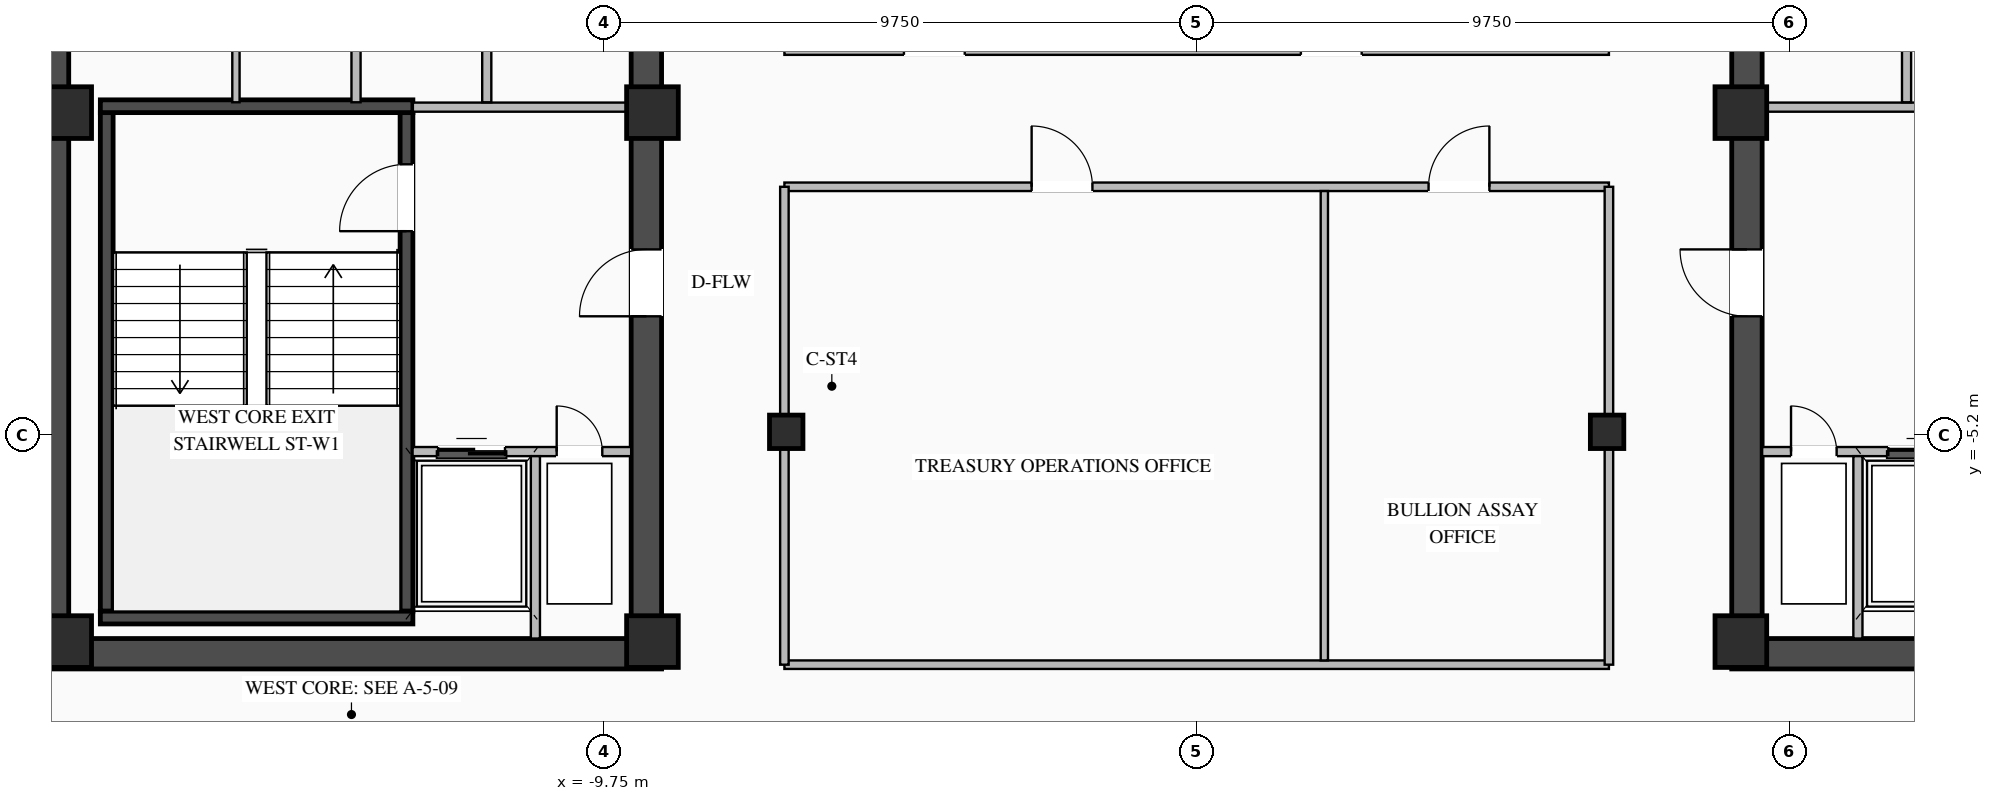
"""IFC4 building model, lengths in metres.
Left out: names, types, materials, properties, quantities, classifications, styles, units other than length and angle.
Written with IfcOpenShell. Run it as: python <this file> out.ifc"""

import sys

from ifc_helpers import new_model, si_unit, direction, frame, frame_2d, origin, origin_2d, place, context, subcontext, project, spatial, rectangle, i_section, extrude, element, fill, save


model = new_model("IFC4")
c1 = context("Model", 3, precision=1e-05, world=origin(), true_north=direction((0.0, 1.0)))
c2 = subcontext(c1, "Body", "Model", "MODEL_VIEW")
j1 = project(units=[si_unit("LENGTHUNIT", "METRE"), si_unit("PLANEANGLEUNIT", "RADIAN")], contexts=[c1])
p1 = place(None, origin())
s1 = spatial("IfcSite", under=j1, at=p1, CompositionType="ELEMENT")
p2 = place(p1, origin())
s2 = spatial("IfcBuilding", under=s1, at=p2, CompositionType="ELEMENT")
p3 = place(p2, frame((0.0, 0.0, 208.5)))
s3 = spatial("IfcBuildingStorey", under=s2, at=p3, CompositionType="ELEMENT", Elevation=208.5)
p4 = place(p3, frame((-19.05, -8.8, 0.0), z_axis=(0.0, 0.0, 1.0), x_axis=(1.0, 0.0, 0.0)))
e1 = element("IfcWall", 1, at=p4, inside=s3, PredefinedType="SHEAR", context=c2, shape_type="SweptSolid", body=[
    extrude(rectangle(XDim=10.25, YDim=0.5, at=frame_2d((5.125, 0.0))), origin(), (0.0, 0.0, 1.0), 3.27),
])
p5 = place(p3, frame((-18.8, -8.55, 0.0), z_axis=(0.0, 0.0, 1.0), x_axis=(0.0, 1.0, 0.0)))
e2 = element("IfcWall", 2, at=p5, inside=s3, PredefinedType="SHEAR", context=c2, shape_type="SweptSolid", body=[
    extrude(rectangle(XDim=17.1, YDim=0.5, at=frame_2d((8.55, 0.0))), origin(), (0.0, 0.0, 1.0), 3.27),
])
p6 = place(p3, frame((-9.05, -8.55, 0.0), z_axis=(0.0, 0.0, 1.0), x_axis=(0.0, 1.0, 0.0)))
e3 = element("IfcWall", 3, at=p6, inside=s3, PredefinedType="SHEAR", context=c2, shape_type="SweptSolid", body=[
    extrude(rectangle(XDim=17.1, YDim=0.5, at=frame_2d((8.55, 0.0))), origin(), (0.0, 0.0, 1.0), 3.27),
])
p7 = place(p6, frame((5.3, 0.0, 0.0)))
e4 = element("IfcOpeningElement", 4, at=p7, cuts=e3, PredefinedType="OPENING", context=c2, shape_type="SweptSolid", body=[
    extrude(rectangle(XDim=1.1, YDim=2.08, at=frame_2d((0.55, 1.04))), frame((0.0, 0.26, 0.0), z_axis=(0.0, -1.0, 0.0), x_axis=(1.0, 0.0, 0.0)), (0.0, 0.0, 1.0), 0.52),
])
p8 = place(p3, frame((-12.995, -8.1, 0.0), z_axis=(0.0, 0.0, 1.0), x_axis=(0.0, 1.0, 0.0)))
e5 = element("IfcWall", 5, at=p8, inside=s3, PredefinedType="SHEAR", context=c2, shape_type="SweptSolid", body=[
    extrude(rectangle(XDim=8.2, YDim=0.21, at=frame_2d((4.1, 0.0))), origin(), (0.0, 0.0, 1.0), 3.27),
])
p9 = place(p8, frame((6.25, 0.0, 0.0)))
e6 = element("IfcOpeningElement", 6, at=p9, cuts=e5, PredefinedType="OPENING", context=c2, shape_type="SweptSolid", body=[
    extrude(rectangle(XDim=1.1, YDim=2.15, at=frame_2d((0.55, 1.075))), frame((0.0, 0.115, 0.0), z_axis=(0.0, -1.0, 0.0), x_axis=(1.0, 0.0, 0.0)), (0.0, 0.0, 1.0), 0.23),
])
p10 = place(p3, frame((-17.925, -8.1, 0.0), z_axis=(0.0, 0.0, 1.0), x_axis=(0.0, 1.0, 0.0)))
e7 = element("IfcWall", 7, at=p10, inside=s3, PredefinedType="SHEAR", context=c2, shape_type="SweptSolid", body=[
    extrude(rectangle(XDim=8.2, YDim=0.21, at=frame_2d((4.1, 0.0))), origin(), (0.0, 0.0, 1.0), 3.27),
])
for number, where, z_axis, x_axis in (
    (8, (-18.03, -8.205, 0.0), (0.0, 0.0, 1.0), (1.0, 0.0, 0.0)),
    (9, (-12.89, 0.205, 0.0), (0.0, 0.0, 1.0), (-1.0, 0.0, 0.0)),
):
    element("IfcWall", number, at=place(p3, frame(where, z_axis=z_axis, x_axis=x_axis)), inside=s3, PredefinedType="SHEAR", context=c2, shape_type="SweptSolid", body=[
        extrude(rectangle(XDim=5.14, YDim=0.21, at=frame_2d((2.57, 0.0))), origin(), (0.0, 0.0, 1.0), 3.27),
    ])
p11 = place(p3, frame((8.8, -8.8, 0.0), z_axis=(0.0, 0.0, 1.0), x_axis=(1.0, 0.0, 0.0)))
e10 = element("IfcWall", 10, at=p11, inside=s3, PredefinedType="SHEAR", context=c2, shape_type="SweptSolid", body=[
    extrude(rectangle(XDim=10.25, YDim=0.5, at=frame_2d((5.125, 0.0))), origin(), (0.0, 0.0, 1.0), 3.27),
])
p12 = place(p3, frame((9.05, -8.55, 0.0), z_axis=(0.0, 0.0, 1.0), x_axis=(0.0, 1.0, 0.0)))
e11 = element("IfcWall", 11, at=p12, inside=s3, PredefinedType="SHEAR", context=c2, shape_type="SweptSolid", body=[
    extrude(rectangle(XDim=17.1, YDim=0.5, at=frame_2d((8.55, 0.0))), origin(), (0.0, 0.0, 1.0), 3.27),
])
p13 = place(p12, frame((5.3, 0.0, 0.0)))
e12 = element("IfcOpeningElement", 12, at=p13, cuts=e11, PredefinedType="OPENING", context=c2, shape_type="SweptSolid", body=[
    extrude(rectangle(XDim=1.1, YDim=2.08, at=frame_2d((0.55, 1.04))), frame((0.0, 0.26, 0.0), z_axis=(0.0, -1.0, 0.0), x_axis=(1.0, 0.0, 0.0)), (0.0, 0.0, 1.0), 0.52),
])
for number, where, z_axis, x_axis in (
    (13, (-8.95, -8.6, 0.0), (0.0, 0.0, 1.0), (1.0, 0.0, 0.0)),
    (14, (-8.95, 0.1, 0.0), (0.0, 0.0, 1.0), (1.0, 0.0, 0.0)),
    (15, (-18.6, -8.6, 0.0), (0.0, 0.0, 1.0), (1.0, 0.0, 0.0)),
    (16, (-18.6, 0.1, 0.0), (0.0, 0.0, 1.0), (1.0, 0.0, 0.0)),
    (17, (8.95, -8.6, 0.0), (0.0, 0.0, 1.0), (1.0, 0.0, 0.0)),
    (18, (8.95, 0.1, 0.0), (0.0, 0.0, 1.0), (1.0, 0.0, 0.0)),
):
    element("IfcColumn", number, at=place(p3, frame(where, z_axis=z_axis, x_axis=x_axis)), inside=s3, PredefinedType="COLUMN", context=c2, shape_type="SweptSolid", body=[
        extrude(rectangle(XDim=0.85, YDim=0.85, at=origin_2d()), origin(), (0.0, 0.0, 1.0), 3.45),
    ])
for number, where, z_axis, x_axis in (
    (19, (-6.75, -5.15, 0.0), (0.0, 0.0, 1.0), (1.0, 0.0, 0.0)),
    (20, (6.75, -5.15, 0.0), (0.0, 0.0, 1.0), (1.0, 0.0, 0.0)),
):
    element("IfcColumn", number, at=place(p3, frame(where, z_axis=z_axis, x_axis=x_axis)), inside=s3, PredefinedType="COLUMN", context=c2, shape_type="SweptSolid", body=[
        extrude(i_section(OverallWidth=0.55, OverallDepth=0.55, WebThickness=0.024, FlangeThickness=0.036, at=origin_2d()), origin(), (0.0, 0.0, 1.0), 3.45),
    ])
p14 = place(p3, frame((-12.895, -5.475, 0.0), z_axis=(0.0, 0.0, 1.0), x_axis=(1.0, 0.0, 0.0)))
e21 = element("IfcWall", 21, at=p14, inside=s3, PredefinedType="STANDARD", context=c2, shape_type="SweptSolid", body=[
    extrude(rectangle(XDim=3.595, YDim=0.15, at=frame_2d((1.797, 0.0))), origin(), (0.0, 0.0, 1.0), 3.25),
])
p15 = place(p14, frame((0.42, 0.0, 0.0)))
e22 = element("IfcOpeningElement", 22, at=p15, cuts=e21, PredefinedType="OPENING", context=c2, shape_type="SweptSolid", body=[
    extrude(rectangle(XDim=1.1, YDim=2.15, at=frame_2d((0.55, 1.075))), frame((0.0, 0.085, 0.0), z_axis=(0.0, -1.0, 0.0), x_axis=(1.0, 0.0, 0.0)), (0.0, 0.0, 1.0), 0.17),
])
p16 = place(p14, frame((2.37, 0.0, 0.0)))
e23 = element("IfcOpeningElement", 23, at=p16, cuts=e21, PredefinedType="OPENING", context=c2, shape_type="SweptSolid", body=[
    extrude(rectangle(XDim=0.75, YDim=2.05, at=frame_2d((0.375, 1.025))), frame((0.0, 0.085, 0.0), z_axis=(0.0, -1.0, 0.0), x_axis=(1.0, 0.0, 0.0)), (0.0, 0.0, 1.0), 0.17),
])
p17 = place(p3, frame((-10.875, -8.55, 0.0), z_axis=(0.0, 0.0, 1.0), x_axis=(0.0, 1.0, 0.0)))
e24 = element("IfcWall", 24, at=p17, inside=s3, PredefinedType="STANDARD", context=c2, shape_type="SweptSolid", body=[
    extrude(rectangle(XDim=3.0, YDim=0.15, at=frame_2d((1.5, 0.0))), origin(), (0.0, 0.0, 1.0), 3.25),
])
p18 = place(p3, frame((-12.89, 0.19, 0.0), z_axis=(0.0, 0.0, 1.0), x_axis=(1.0, 0.0, 0.0)))
e25 = element("IfcWall", 25, at=p18, inside=s3, PredefinedType="STANDARD", context=c2, shape_type="SweptSolid", body=[
    extrude(rectangle(XDim=3.59, YDim=0.15, at=frame_2d((1.795, 0.0))), origin(), (0.0, 0.0, 1.0), 2.645),
])
p19 = place(p3, frame((-11.675, 0.27, 0.0), z_axis=(0.0, 0.0, 1.0), x_axis=(0.0, 1.0, 0.0)))
e26 = element("IfcWall", 26, at=p19, inside=s3, PredefinedType="STANDARD", context=c2, shape_type="SweptSolid", body=[
    extrude(rectangle(XDim=8.28, YDim=0.15, at=frame_2d((4.14, 0.0))), origin(), (0.0, 0.0, 1.0), 3.25),
])
p20 = place(p19, frame((2.65, 0.0, 0.0)))
e27 = element("IfcOpeningElement", 27, at=p20, cuts=e26, PredefinedType="OPENING", context=c2, shape_type="SweptSolid", body=[
    extrude(rectangle(XDim=0.9, YDim=2.05, at=frame_2d((0.45, 1.025))), frame((0.0, 0.085, 0.0), z_axis=(0.0, -1.0, 0.0), x_axis=(1.0, 0.0, 0.0)), (0.0, 0.0, 1.0), 0.17),
])
p21 = place(p19, frame((6.45, 0.0, 0.0)))
e28 = element("IfcOpeningElement", 28, at=p21, cuts=e26, PredefinedType="OPENING", context=c2, shape_type="SweptSolid", body=[
    extrude(rectangle(XDim=0.9, YDim=2.05, at=frame_2d((0.45, 1.025))), frame((0.0, 0.085, 0.0), z_axis=(0.0, -1.0, 0.0), x_axis=(1.0, 0.0, 0.0)), (0.0, 0.0, 1.0), 0.17),
])
p22 = place(p3, frame((-13.825, 0.27, 0.0), z_axis=(0.0, 0.0, 1.0), x_axis=(0.0, 1.0, 0.0)))
e29 = element("IfcWall", 29, at=p22, inside=s3, PredefinedType="STANDARD", context=c2, shape_type="SweptSolid", body=[
    extrude(rectangle(XDim=8.28, YDim=0.15, at=frame_2d((4.14, 0.0))), origin(), (0.0, 0.0, 1.0), 3.25),
])
p23 = place(p22, frame((4.175, 0.0, 0.0)))
e30 = element("IfcOpeningElement", 30, at=p23, cuts=e29, PredefinedType="OPENING", context=c2, shape_type="SweptSolid", body=[
    extrude(rectangle(XDim=1.1, YDim=2.1, at=frame_2d((0.55, 1.05))), frame((0.0, 0.085, 0.0), z_axis=(0.0, -1.0, 0.0), x_axis=(1.0, 0.0, 0.0)), (0.0, 0.0, 1.0), 0.17),
])
p24 = place(p22, frame((6.245, 0.0, 0.0)))
e31 = element("IfcOpeningElement", 31, at=p24, cuts=e29, PredefinedType="OPENING", context=c2, shape_type="SweptSolid", body=[
    extrude(rectangle(XDim=1.1, YDim=2.1, at=frame_2d((0.55, 1.05))), frame((0.0, 0.085, 0.0), z_axis=(0.0, -1.0, 0.0), x_axis=(1.0, 0.0, 0.0)), (0.0, 0.0, 1.0), 0.17),
])
p25 = place(p22, frame((1.15, 0.0, 0.0)))
e32 = element("IfcOpeningElement", 32, at=p25, cuts=e29, PredefinedType="OPENING", context=c2, shape_type="SweptSolid", body=[
    extrude(rectangle(XDim=0.9, YDim=2.05, at=frame_2d((0.45, 1.025))), frame((0.0, 0.085, 0.0), z_axis=(0.0, -1.0, 0.0), x_axis=(1.0, 0.0, 0.0)), (0.0, 0.0, 1.0), 0.17),
])
p26 = place(p3, frame((-15.8, 0.27, 0.0), z_axis=(0.0, 0.0, 1.0), x_axis=(0.0, 1.0, 0.0)))
e33 = element("IfcWall", 33, at=p26, inside=s3, PredefinedType="STANDARD", context=c2, shape_type="SweptSolid", body=[
    extrude(rectangle(XDim=3.59, YDim=0.12, at=frame_2d((1.795, 0.0))), origin(), (0.0, 0.0, 1.0), 3.25),
])
p27 = place(p26, frame((1.25, 0.0, 0.0)))
e34 = element("IfcOpeningElement", 34, at=p27, cuts=e33, PredefinedType="OPENING", context=c2, shape_type="SweptSolid", body=[
    extrude(rectangle(XDim=0.85, YDim=2.05, at=frame_2d((0.425, 1.025))), frame((0.0, 0.07, 0.0), z_axis=(0.0, -1.0, 0.0), x_axis=(1.0, 0.0, 0.0)), (0.0, 0.0, 1.0), 0.14),
])
p28 = place(p3, frame((9.3, -5.475, 0.0), z_axis=(0.0, 0.0, 1.0), x_axis=(1.0, 0.0, 0.0)))
e35 = element("IfcWall", 35, at=p28, inside=s3, PredefinedType="STANDARD", context=c2, shape_type="SweptSolid", body=[
    extrude(rectangle(XDim=3.595, YDim=0.15, at=frame_2d((1.797, 0.0))), origin(), (0.0, 0.0, 1.0), 3.25),
])
p29 = place(p28, frame((2.075, 0.0, 0.0)))
e36 = element("IfcOpeningElement", 36, at=p29, cuts=e35, PredefinedType="OPENING", context=c2, shape_type="SweptSolid", body=[
    extrude(rectangle(XDim=1.1, YDim=2.15, at=frame_2d((0.55, 1.075))), frame((0.0, 0.085, 0.0), z_axis=(0.0, -1.0, 0.0), x_axis=(1.0, 0.0, 0.0)), (0.0, 0.0, 1.0), 0.17),
])
p30 = place(p28, frame((0.475, 0.0, 0.0)))
e37 = element("IfcOpeningElement", 37, at=p30, cuts=e35, PredefinedType="OPENING", context=c2, shape_type="SweptSolid", body=[
    extrude(rectangle(XDim=0.75, YDim=2.05, at=frame_2d((0.375, 1.025))), frame((0.0, 0.085, 0.0), z_axis=(0.0, -1.0, 0.0), x_axis=(1.0, 0.0, 0.0)), (0.0, 0.0, 1.0), 0.17),
])
p31 = place(p3, frame((10.875, -8.55, 0.0), z_axis=(0.0, 0.0, 1.0), x_axis=(0.0, 1.0, 0.0)))
e38 = element("IfcWall", 38, at=p31, inside=s3, PredefinedType="STANDARD", context=c2, shape_type="SweptSolid", body=[
    extrude(rectangle(XDim=3.0, YDim=0.15, at=frame_2d((1.5, 0.0))), origin(), (0.0, 0.0, 1.0), 3.25),
])
p32 = place(p3, frame((9.3, 0.19, 0.0), z_axis=(0.0, 0.0, 1.0), x_axis=(1.0, 0.0, 0.0)))
e39 = element("IfcWall", 39, at=p32, inside=s3, PredefinedType="STANDARD", context=c2, shape_type="SweptSolid", body=[
    extrude(rectangle(XDim=3.59, YDim=0.15, at=frame_2d((1.795, 0.0))), origin(), (0.0, 0.0, 1.0), 2.645),
])
p33 = place(p3, frame((11.675, 0.27, 0.0), z_axis=(0.0, 0.0, 1.0), x_axis=(0.0, 1.0, 0.0)))
e40 = element("IfcWall", 40, at=p33, inside=s3, PredefinedType="STANDARD", context=c2, shape_type="SweptSolid", body=[
    extrude(rectangle(XDim=8.28, YDim=0.15, at=frame_2d((4.14, 0.0))), origin(), (0.0, 0.0, 1.0), 3.25),
])
p34 = place(p33, frame((2.85, 0.0, 0.0)))
e41 = element("IfcOpeningElement", 41, at=p34, cuts=e40, PredefinedType="OPENING", context=c2, shape_type="SweptSolid", body=[
    extrude(rectangle(XDim=0.95, YDim=2.05, at=frame_2d((0.475, 1.025))), frame((0.0, 0.085, 0.0), z_axis=(0.0, -1.0, 0.0), x_axis=(1.0, 0.0, 0.0)), (0.0, 0.0, 1.0), 0.17),
])
p35 = place(p3, frame((-6.78, 1.12, 0.0), z_axis=(0.0, 0.0, 1.0), x_axis=(1.0, 0.0, 0.0)))
e42 = element("IfcWall", 42, at=p35, inside=s3, PredefinedType="STANDARD", context=c2, shape_type="SweptSolid", body=[
    extrude(rectangle(XDim=13.56, YDim=0.14, at=frame_2d((6.78, 0.0))), origin(), (0.0, 0.0, 1.0), 3.25),
])
p36 = place(p35, frame((1.966, 0.0, 0.0)))
e43 = element("IfcOpeningElement", 43, at=p36, cuts=e42, PredefinedType="OPENING", context=c2, shape_type="SweptSolid", body=[
    extrude(rectangle(XDim=1.0, YDim=2.08, at=frame_2d((0.5, 1.04))), frame((0.0, 0.08, 0.0), z_axis=(0.0, -1.0, 0.0), x_axis=(1.0, 0.0, 0.0)), (0.0, 0.0, 1.0), 0.16),
])
p37 = place(p35, frame((8.494, 0.0, 0.0)))
e44 = element("IfcOpeningElement", 44, at=p37, cuts=e42, PredefinedType="OPENING", context=c2, shape_type="SweptSolid", body=[
    extrude(rectangle(XDim=1.0, YDim=2.08, at=frame_2d((0.5, 1.04))), frame((0.0, 0.08, 0.0), z_axis=(0.0, -1.0, 0.0), x_axis=(1.0, 0.0, 0.0)), (0.0, 0.0, 1.0), 0.16),
])
p38 = place(p3, frame((-6.78, -1.12, 0.0), z_axis=(0.0, 0.0, 1.0), x_axis=(1.0, 0.0, 0.0)))
e45 = element("IfcWall", 45, at=p38, inside=s3, PredefinedType="STANDARD", context=c2, shape_type="SweptSolid", body=[
    extrude(rectangle(XDim=13.56, YDim=0.14, at=frame_2d((6.78, 0.0))), origin(), (0.0, 0.0, 1.0), 3.25),
])
p39 = place(p38, frame((4.066, 0.0, 0.0)))
e46 = element("IfcOpeningElement", 46, at=p39, cuts=e45, PredefinedType="OPENING", context=c2, shape_type="SweptSolid", body=[
    extrude(rectangle(XDim=1.0, YDim=2.08, at=frame_2d((0.5, 1.04))), frame((0.0, 0.08, 0.0), z_axis=(0.0, -1.0, 0.0), x_axis=(1.0, 0.0, 0.0)), (0.0, 0.0, 1.0), 0.16),
])
p40 = place(p38, frame((10.594, 0.0, 0.0)))
e47 = element("IfcOpeningElement", 47, at=p40, cuts=e45, PredefinedType="OPENING", context=c2, shape_type="SweptSolid", body=[
    extrude(rectangle(XDim=1.0, YDim=2.08, at=frame_2d((0.5, 1.04))), frame((0.0, 0.08, 0.0), z_axis=(0.0, -1.0, 0.0), x_axis=(1.0, 0.0, 0.0)), (0.0, 0.0, 1.0), 0.16),
])
p41 = place(p3, frame((-6.78, -8.98, 0.0), z_axis=(0.0, 0.0, 1.0), x_axis=(1.0, 0.0, 0.0)))
e48 = element("IfcWall", 48, at=p41, inside=s3, PredefinedType="STANDARD", context=c2, shape_type="SweptSolid", body=[
    extrude(rectangle(XDim=13.56, YDim=0.14, at=frame_2d((6.78, 0.0))), origin(), (0.0, 0.0, 1.0), 3.25),
])
for number, where, z_axis, x_axis in (
    (49, (-6.78, -8.98, 0.0), (0.0, 0.0, 1.0), (0.0, 1.0, 0.0)),
    (50, (6.78, -8.98, 0.0), (0.0, 0.0, 1.0), (0.0, 1.0, 0.0)),
):
    element("IfcWall", number, at=place(p3, frame(where, z_axis=z_axis, x_axis=x_axis)), inside=s3, PredefinedType="STANDARD", context=c2, shape_type="SweptSolid", body=[
        extrude(rectangle(XDim=7.86, YDim=0.14, at=frame_2d((3.93, 0.0))), origin(), (0.0, 0.0, 1.0), 2.645),
    ])
p42 = place(p3, frame((2.1, -8.91, 0.0), z_axis=(0.0, 0.0, 1.0), x_axis=(0.0, 1.0, 0.0)))
e51 = element("IfcWall", 51, at=p42, inside=s3, PredefinedType="STANDARD", context=c2, shape_type="SweptSolid", body=[
    extrude(rectangle(XDim=7.72, YDim=0.12, at=frame_2d((3.86, 0.0))), origin(), (0.0, 0.0, 1.0), 3.25),
])
p43 = place(p9, origin())
e52 = element("IfcDoor", 52, at=p43, inside=s3, OperationType="SINGLE_SWING_LEFT", PredefinedType="DOOR", context=c2, shape_type="SweptSolid", body=[
    extrude(rectangle(XDim=1.1, YDim=2.15, at=frame_2d((0.55, 1.075))), frame((0.0, 0.025, 0.0), z_axis=(0.0, -1.0, 0.0), x_axis=(1.0, 0.0, 0.0)), (0.0, 0.0, 1.0), 0.05),
])
fill(e6, e52)
p44 = place(p15, origin())
e53 = element("IfcDoor", 53, at=p44, inside=s3, OperationType="DOUBLE_DOOR_SLIDING", PredefinedType="DOOR", context=c2, shape_type="SweptSolid", body=[
    extrude(rectangle(XDim=1.1, YDim=2.15, at=frame_2d((0.55, 1.075))), frame((0.0, 0.025, 0.0), z_axis=(0.0, -1.0, 0.0), x_axis=(1.0, 0.0, 0.0)), (0.0, 0.0, 1.0), 0.05),
])
fill(e22, e53)
p45 = place(p16, origin())
e54 = element("IfcDoor", 54, at=p45, inside=s3, OperationType="SINGLE_SWING_LEFT", PredefinedType="DOOR", context=c2, shape_type="SweptSolid", body=[
    extrude(rectangle(XDim=0.75, YDim=2.05, at=frame_2d((0.375, 1.025))), frame((0.0, 0.025, 0.0), z_axis=(0.0, -1.0, 0.0), x_axis=(1.0, 0.0, 0.0)), (0.0, 0.0, 1.0), 0.05),
])
fill(e23, e54)
p46 = place(p7, origin())
e55 = element("IfcDoor", 55, at=p46, inside=s3, OperationType="SINGLE_SWING_LEFT", PredefinedType="DOOR", context=c2, shape_type="SweptSolid", body=[
    extrude(rectangle(XDim=1.1, YDim=2.08, at=frame_2d((0.55, 1.04))), frame((0.0, 0.205, 0.0), z_axis=(0.0, -1.0, 0.0), x_axis=(1.0, 0.0, 0.0)), (0.0, 0.0, 1.0), 0.05),
])
fill(e4, e55)
p47 = place(p29, origin())
e56 = element("IfcDoor", 56, at=p47, inside=s3, OperationType="DOUBLE_DOOR_SLIDING", PredefinedType="DOOR", context=c2, shape_type="SweptSolid", body=[
    extrude(rectangle(XDim=1.1, YDim=2.15, at=frame_2d((0.55, 1.075))), frame((0.0, 0.025, 0.0), z_axis=(0.0, -1.0, 0.0), x_axis=(1.0, 0.0, 0.0)), (0.0, 0.0, 1.0), 0.05),
])
fill(e36, e56)
p48 = place(p30, origin())
e57 = element("IfcDoor", 57, at=p48, inside=s3, OperationType="SINGLE_SWING_LEFT", PredefinedType="DOOR", context=c2, shape_type="SweptSolid", body=[
    extrude(rectangle(XDim=0.75, YDim=2.05, at=frame_2d((0.375, 1.025))), frame((0.0, 0.025, 0.0), z_axis=(0.0, -1.0, 0.0), x_axis=(1.0, 0.0, 0.0)), (0.0, 0.0, 1.0), 0.05),
])
fill(e37, e57)
p49 = place(p13, origin())
e58 = element("IfcDoor", 58, at=p49, inside=s3, OperationType="SINGLE_SWING_RIGHT", PredefinedType="DOOR", context=c2, shape_type="SweptSolid", body=[
    extrude(rectangle(XDim=1.1, YDim=2.08, at=frame_2d((0.55, 1.04))), frame((0.0, -0.155, 0.0), z_axis=(0.0, -1.0, 0.0), x_axis=(1.0, 0.0, 0.0)), (0.0, 0.0, 1.0), 0.05),
])
fill(e12, e58)
p50 = place(p36, origin())
e59 = element("IfcDoor", 59, at=p50, inside=s3, OperationType="SINGLE_SWING_LEFT", PredefinedType="DOOR", context=c2, shape_type="SweptSolid", body=[
    extrude(rectangle(XDim=1.0, YDim=2.08, at=frame_2d((0.5, 1.04))), frame((0.0, 0.025, 0.0), z_axis=(0.0, -1.0, 0.0), x_axis=(1.0, 0.0, 0.0)), (0.0, 0.0, 1.0), 0.05),
])
fill(e43, e59)
p51 = place(p37, origin())
e60 = element("IfcDoor", 60, at=p51, inside=s3, OperationType="SINGLE_SWING_RIGHT", PredefinedType="DOOR", context=c2, shape_type="SweptSolid", body=[
    extrude(rectangle(XDim=1.0, YDim=2.08, at=frame_2d((0.5, 1.04))), frame((0.0, 0.025, 0.0), z_axis=(0.0, -1.0, 0.0), x_axis=(1.0, 0.0, 0.0)), (0.0, 0.0, 1.0), 0.05),
])
fill(e44, e60)
p52 = place(p39, origin())
e61 = element("IfcDoor", 61, at=p52, inside=s3, OperationType="SINGLE_SWING_LEFT", PredefinedType="DOOR", context=c2, shape_type="SweptSolid", body=[
    extrude(rectangle(XDim=1.0, YDim=2.08, at=frame_2d((0.5, 1.04))), frame((0.0, 0.025, 0.0), z_axis=(0.0, -1.0, 0.0), x_axis=(1.0, 0.0, 0.0)), (0.0, 0.0, 1.0), 0.05),
])
fill(e46, e61)
p53 = place(p40, origin())
e62 = element("IfcDoor", 62, at=p53, inside=s3, OperationType="SINGLE_SWING_RIGHT", PredefinedType="DOOR", context=c2, shape_type="SweptSolid", body=[
    extrude(rectangle(XDim=1.0, YDim=2.08, at=frame_2d((0.5, 1.04))), frame((0.0, 0.025, 0.0), z_axis=(0.0, -1.0, 0.0), x_axis=(1.0, 0.0, 0.0)), (0.0, 0.0, 1.0), 0.05),
])
fill(e47, e62)
save(model, sys.argv[1])
